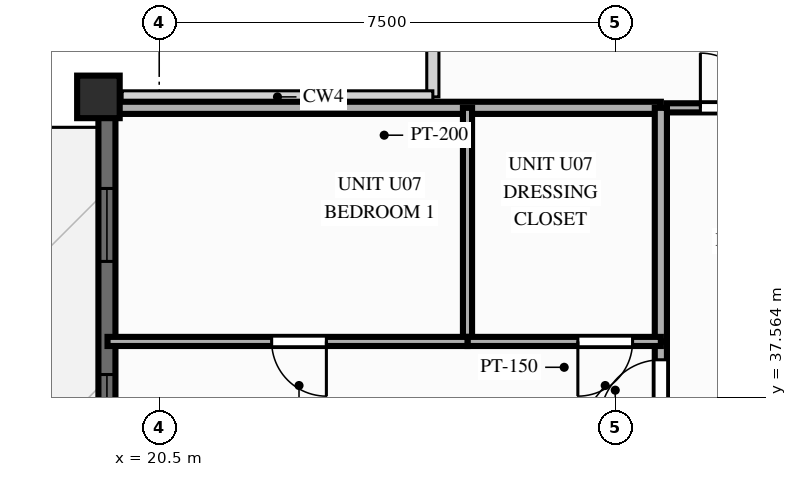
"""IFC4 building model, lengths in metres.
Left out: names, types, materials, properties, quantities, classifications, styles, units other than length and angle.
Written with IfcOpenShell. Run it as: python <this file> out.ifc"""

import sys

from ifc_helpers import new_model, si_unit, direction, frame, frame_2d, origin, origin_2d, place, context, subcontext, project, spatial, rectangle, extrude, source, transform, mapped, element, fill, save


model = new_model("IFC4")
c1 = context("Model", 3, precision=1e-05, world=origin(), true_north=direction((0.0, 1.0)))
c2 = subcontext(c1, "Body", "Model", "MODEL_VIEW")
j1 = project(units=[si_unit("LENGTHUNIT", "METRE"), si_unit("PLANEANGLEUNIT", "RADIAN")], contexts=[c1])
p1 = place(None, origin())
s1 = spatial("IfcSite", under=j1, at=p1, CompositionType="ELEMENT")
p2 = place(p1, origin())
s2 = spatial("IfcBuilding", under=s1, at=p2, CompositionType="ELEMENT")
p3 = place(p2, frame((0.0, 0.0, 216.3)))
s3 = spatial("IfcBuildingStorey", under=s2, at=p3, CompositionType="ELEMENT", Elevation=216.3)
m1 = source(origin(), c2, "Body", "SweptSolid", [
    extrude(rectangle(XDim=0.7, YDim=0.7, at=origin_2d()), origin(), (0.0, 0.0, 1.0), 3.9),
])
p4 = place(p3, frame((19.5, 42.5, 0.0), z_axis=(0.0, 0.0, 1.0), x_axis=(1.0, 0.0, 0.0)))
e1 = element("IfcColumn", 1, at=p4, inside=s3, PredefinedType="COLUMN", context=c2, shape_type="MappedRepresentation", body=[
    mapped(m1, transform((0.0, 0.0, 0.0), scale=1.0)),
])
p5 = place(p3, frame((19.64, 11.5, 0.0), z_axis=(0.0, 0.0, 1.0), x_axis=(0.0, 1.0, 0.0)))
e2 = element("IfcWall", 2, at=p5, inside=s3, PredefinedType="SOLIDWALL", context=c2, shape_type="SweptSolid", body=[
    extrude(rectangle(XDim=31.0, YDim=0.28, at=frame_2d((15.5, 0.0))), origin(), (0.0, 0.0, 1.0), 2.44),
])
p6 = place(p5, frame((0.96, 0.0, 0.25)))
e3 = element("IfcOpeningElement", 3, at=p6, cuts=e2, PredefinedType="OPENING", context=c2, shape_type="SweptSolid", body=[
    extrude(rectangle(XDim=1.2, YDim=1.5, at=frame_2d((0.6, 0.75))), frame((0.0, 0.152, 0.0), z_axis=(0.0, -1.0, 0.0), x_axis=(1.0, 0.0, 0.0)), (0.0, 0.0, 1.0), 0.304),
])
p7 = place(p5, frame((4.02, 0.0, 0.25)))
e4 = element("IfcOpeningElement", 4, at=p7, cuts=e2, PredefinedType="OPENING", context=c2, shape_type="SweptSolid", body=[
    extrude(rectangle(XDim=1.2, YDim=1.5, at=frame_2d((0.6, 0.75))), frame((0.0, 0.152, 0.0), z_axis=(0.0, -1.0, 0.0), x_axis=(1.0, 0.0, 0.0)), (0.0, 0.0, 1.0), 0.304),
])
p8 = place(p5, frame((8.089, 0.0, 0.25)))
e5 = element("IfcOpeningElement", 5, at=p8, cuts=e2, PredefinedType="OPENING", context=c2, shape_type="SweptSolid", body=[
    extrude(rectangle(XDim=1.2, YDim=1.5, at=frame_2d((0.6, 0.75))), frame((0.0, 0.152, 0.0), z_axis=(0.0, -1.0, 0.0), x_axis=(1.0, 0.0, 0.0)), (0.0, 0.0, 1.0), 0.304),
])
p9 = place(p5, frame((11.373, 0.0, 0.25)))
e6 = element("IfcOpeningElement", 6, at=p9, cuts=e2, PredefinedType="OPENING", context=c2, shape_type="SweptSolid", body=[
    extrude(rectangle(XDim=1.2, YDim=1.5, at=frame_2d((0.6, 0.75))), frame((0.0, 0.152, 0.0), z_axis=(0.0, -1.0, 0.0), x_axis=(1.0, 0.0, 0.0)), (0.0, 0.0, 1.0), 0.304),
])
p10 = place(p5, frame((14.307, 0.0, 0.0)))
e7 = element("IfcOpeningElement", 7, at=p10, cuts=e2, PredefinedType="OPENING", context=c2, shape_type="SweptSolid", body=[
    extrude(rectangle(XDim=1.6, YDim=2.15, at=frame_2d((0.8, 1.075))), frame((0.0, 0.152, 0.0), z_axis=(0.0, -1.0, 0.0), x_axis=(1.0, 0.0, 0.0)), (0.0, 0.0, 1.0), 0.304),
])
p11 = place(p5, frame((18.188, 0.0, 0.25)))
e8 = element("IfcOpeningElement", 8, at=p11, cuts=e2, PredefinedType="OPENING", context=c2, shape_type="SweptSolid", body=[
    extrude(rectangle(XDim=1.2, YDim=1.5, at=frame_2d((0.6, 0.75))), frame((0.0, 0.152, 0.0), z_axis=(0.0, -1.0, 0.0), x_axis=(1.0, 0.0, 0.0)), (0.0, 0.0, 1.0), 0.304),
])
p12 = place(p5, frame((21.484, 0.0, 0.25)))
e9 = element("IfcOpeningElement", 9, at=p12, cuts=e2, PredefinedType="OPENING", context=c2, shape_type="SweptSolid", body=[
    extrude(rectangle(XDim=1.2, YDim=1.5, at=frame_2d((0.6, 0.75))), frame((0.0, 0.152, 0.0), z_axis=(0.0, -1.0, 0.0), x_axis=(1.0, 0.0, 0.0)), (0.0, 0.0, 1.0), 0.304),
])
p13 = place(p5, frame((25.234, 0.0, 0.25)))
e10 = element("IfcOpeningElement", 10, at=p13, cuts=e2, PredefinedType="OPENING", context=c2, shape_type="SweptSolid", body=[
    extrude(rectangle(XDim=1.2, YDim=1.5, at=frame_2d((0.6, 0.75))), frame((0.0, 0.152, 0.0), z_axis=(0.0, -1.0, 0.0), x_axis=(1.0, 0.0, 0.0)), (0.0, 0.0, 1.0), 0.304),
])
p14 = place(p5, frame((28.294, 0.0, 0.25)))
e11 = element("IfcOpeningElement", 11, at=p14, cuts=e2, PredefinedType="OPENING", context=c2, shape_type="SweptSolid", body=[
    extrude(rectangle(XDim=1.2, YDim=1.5, at=frame_2d((0.6, 0.75))), frame((0.0, 0.152, 0.0), z_axis=(0.0, -1.0, 0.0), x_axis=(1.0, 0.0, 0.0)), (0.0, 0.0, 1.0), 0.304),
])
p15 = place(p3, frame((28.85, 42.32, 0.0), z_axis=(0.0, 0.0, 1.0), x_axis=(1.0, 0.0, 0.0)))
e12 = element("IfcWall", 12, at=p15, inside=s3, PredefinedType="PARTITIONING", context=c2, shape_type="SweptSolid", body=[
    extrude(rectangle(XDim=2.33, YDim=0.15, at=frame_2d((1.165, 0.0))), origin(), (0.0, 0.0, 1.0), 2.24),
])
p16 = place(p15, frame((0.55, 0.0, 0.0)))
e13 = element("IfcOpeningElement", 13, at=p16, cuts=e12, PredefinedType="OPENING", context=c2, shape_type="SweptSolid", body=[
    extrude(rectangle(XDim=0.9, YDim=2.1, at=frame_2d((0.45, 1.05))), frame((0.0, 0.087, 0.0), z_axis=(0.0, -1.0, 0.0), x_axis=(1.0, 0.0, 0.0)), (0.0, 0.0, 1.0), 0.174),
])
p17 = place(p3, frame((28.75, 42.32, 0.0), z_axis=(0.0, 0.0, 1.0), x_axis=(-1.0, 0.0, 0.0)))
e14 = element("IfcWall", 14, at=p17, inside=s3, PredefinedType="PARTITIONING", context=c2, shape_type="SweptSolid", body=[
    extrude(rectangle(XDim=9.1, YDim=0.2, at=frame_2d((4.55, 0.0))), origin(), (0.0, 0.0, 1.0), 2.24),
])
p18 = place(p3, frame((28.75, 34.959, 0.0), z_axis=(0.0, 0.0, 1.0), x_axis=(0.0, 1.0, 0.0)))
e15 = element("IfcWall", 15, at=p18, inside=s3, PredefinedType="PARTITIONING", context=c2, shape_type="SweptSolid", body=[
    extrude(rectangle(XDim=3.519, YDim=0.2, at=frame_2d((1.76, 0.0))), origin(), (0.0, 0.0, 1.0), 3.56),
])
p19 = place(p18, frame((2.217, 0.0, 0.0)))
e16 = element("IfcOpeningElement", 16, at=p19, cuts=e15, PredefinedType="OPENING", context=c2, shape_type="SweptSolid", body=[
    extrude(rectangle(XDim=1.0, YDim=2.15, at=frame_2d((0.5, 1.075))), frame((0.0, 0.112, 0.0), z_axis=(0.0, -1.0, 0.0), x_axis=(1.0, 0.0, 0.0)), (0.0, 0.0, 1.0), 0.224),
])
p20 = place(p3, frame((28.75, 38.478, 0.0), z_axis=(0.0, 0.0, 1.0), x_axis=(0.0, 1.0, 0.0)))
e17 = element("IfcWall", 17, at=p20, inside=s3, PredefinedType="PARTITIONING", context=c2, shape_type="SweptSolid", body=[
    extrude(rectangle(XDim=3.842, YDim=0.2, at=frame_2d((1.921, 0.0))), origin(), (0.0, 0.0, 1.0), 3.56),
])
p21 = place(p3, frame((25.57, 38.478, 0.0), z_axis=(0.0, 0.0, 1.0), x_axis=(0.0, 1.0, 0.0)))
e18 = element("IfcWall", 18, at=p21, inside=s3, PredefinedType="PARTITIONING", context=c2, shape_type="SweptSolid", body=[
    extrude(rectangle(XDim=3.842, YDim=0.15, at=frame_2d((1.921, 0.0))), origin(), (0.0, 0.0, 1.0), 3.56),
])
p22 = place(p3, frame((28.75, 38.478, 0.0), z_axis=(0.0, 0.0, 1.0), x_axis=(-1.0, 0.0, 0.0)))
e19 = element("IfcWall", 19, at=p22, inside=s3, PredefinedType="PARTITIONING", context=c2, shape_type="SweptSolid", body=[
    extrude(rectangle(XDim=3.18, YDim=0.15, at=frame_2d((1.59, 0.0))), origin(), (0.0, 0.0, 1.0), 3.56),
])
p23 = place(p22, frame((0.465, 0.0, 0.0)))
e20 = element("IfcOpeningElement", 20, at=p23, cuts=e19, PredefinedType="OPENING", context=c2, shape_type="SweptSolid", body=[
    extrude(rectangle(XDim=0.9, YDim=2.1, at=frame_2d((0.45, 1.05))), frame((0.0, 0.087, 0.0), z_axis=(0.0, -1.0, 0.0), x_axis=(1.0, 0.0, 0.0)), (0.0, 0.0, 1.0), 0.174),
])
p24 = place(p3, frame((25.57, 38.478, 0.0), z_axis=(0.0, 0.0, 1.0), x_axis=(-1.0, 0.0, 0.0)))
e21 = element("IfcWall", 21, at=p24, inside=s3, PredefinedType="PARTITIONING", context=c2, shape_type="SweptSolid", body=[
    extrude(rectangle(XDim=5.92, YDim=0.15, at=frame_2d((2.96, 0.0))), origin(), (0.0, 0.0, 1.0), 3.56),
])
p25 = place(p24, frame((2.321, 0.0, 0.0)))
e22 = element("IfcOpeningElement", 22, at=p25, cuts=e21, PredefinedType="OPENING", context=c2, shape_type="SweptSolid", body=[
    extrude(rectangle(XDim=0.9, YDim=2.1, at=frame_2d((0.45, 1.05))), frame((0.0, 0.087, 0.0), z_axis=(0.0, -1.0, 0.0), x_axis=(1.0, 0.0, 0.0)), (0.0, 0.0, 1.0), 0.174),
])
m2 = source(origin(), c2, "Body", "SweptSolid", [
    extrude(rectangle(XDim=1.2, YDim=1.5, at=frame_2d((0.6, 0.75))), frame((0.0, 0.03, 0.0), z_axis=(0.0, -1.0, 0.0), x_axis=(1.0, 0.0, 0.0)), (0.0, 0.0, 1.0), 0.06),
])
p26 = place(p13, origin())
e23 = element("IfcWindow", 23, at=p26, inside=s3, PartitioningType="SINGLE_PANEL", PredefinedType="WINDOW", context=c2, shape_type="MappedRepresentation", body=[
    mapped(m2, transform((0.0, 0.0, 0.0), scale=1.0)),
])
fill(e10, e23)
p27 = place(p14, origin())
e24 = element("IfcWindow", 24, at=p27, inside=s3, PartitioningType="SINGLE_PANEL", PredefinedType="WINDOW", context=c2, shape_type="MappedRepresentation", body=[
    mapped(m2, transform((0.0, 0.0, 0.0), scale=1.0)),
])
fill(e11, e24)
m3 = source(origin(), c2, "Body", "SweptSolid", [
    extrude(rectangle(XDim=0.9, YDim=2.1, at=frame_2d((0.45, 1.05))), frame((0.0, 0.025, 0.0), z_axis=(0.0, -1.0, 0.0), x_axis=(1.0, 0.0, 0.0)), (0.0, 0.0, 1.0), 0.05),
])
p28 = place(p16, origin())
e25 = element("IfcDoor", 25, at=p28, inside=s3, OperationType="SINGLE_SWING_LEFT", PredefinedType="DOOR", context=c2, shape_type="MappedRepresentation", body=[
    mapped(m3, transform((0.0, 0.0, 0.0), scale=1.0)),
])
fill(e13, e25)
m4 = source(origin(), c2, "Body", "SweptSolid", [
    extrude(rectangle(XDim=1.0, YDim=2.15, at=frame_2d((0.5, 1.075))), frame((0.0, 0.025, 0.0), z_axis=(0.0, -1.0, 0.0), x_axis=(1.0, 0.0, 0.0)), (0.0, 0.0, 1.0), 0.05),
])
p29 = place(p19, origin())
e26 = element("IfcDoor", 26, at=p29, inside=s3, OperationType="SINGLE_SWING_LEFT", PredefinedType="DOOR", context=c2, shape_type="MappedRepresentation", body=[
    mapped(m4, transform((0.0, 0.0, 0.0), scale=1.0)),
])
fill(e16, e26)
p30 = place(p23, origin())
e27 = element("IfcDoor", 27, at=p30, inside=s3, OperationType="SINGLE_SWING_RIGHT", PredefinedType="DOOR", context=c2, shape_type="MappedRepresentation", body=[
    mapped(m3, transform((0.0, 0.0, 0.0), scale=1.0)),
])
fill(e20, e27)
p31 = place(p25, origin())
e28 = element("IfcDoor", 28, at=p31, inside=s3, OperationType="SINGLE_SWING_LEFT", PredefinedType="DOOR", context=c2, shape_type="MappedRepresentation", body=[
    mapped(m3, transform((0.0, 0.0, 0.0), scale=1.0)),
])
fill(e22, e28)
save(model, sys.argv[1])
